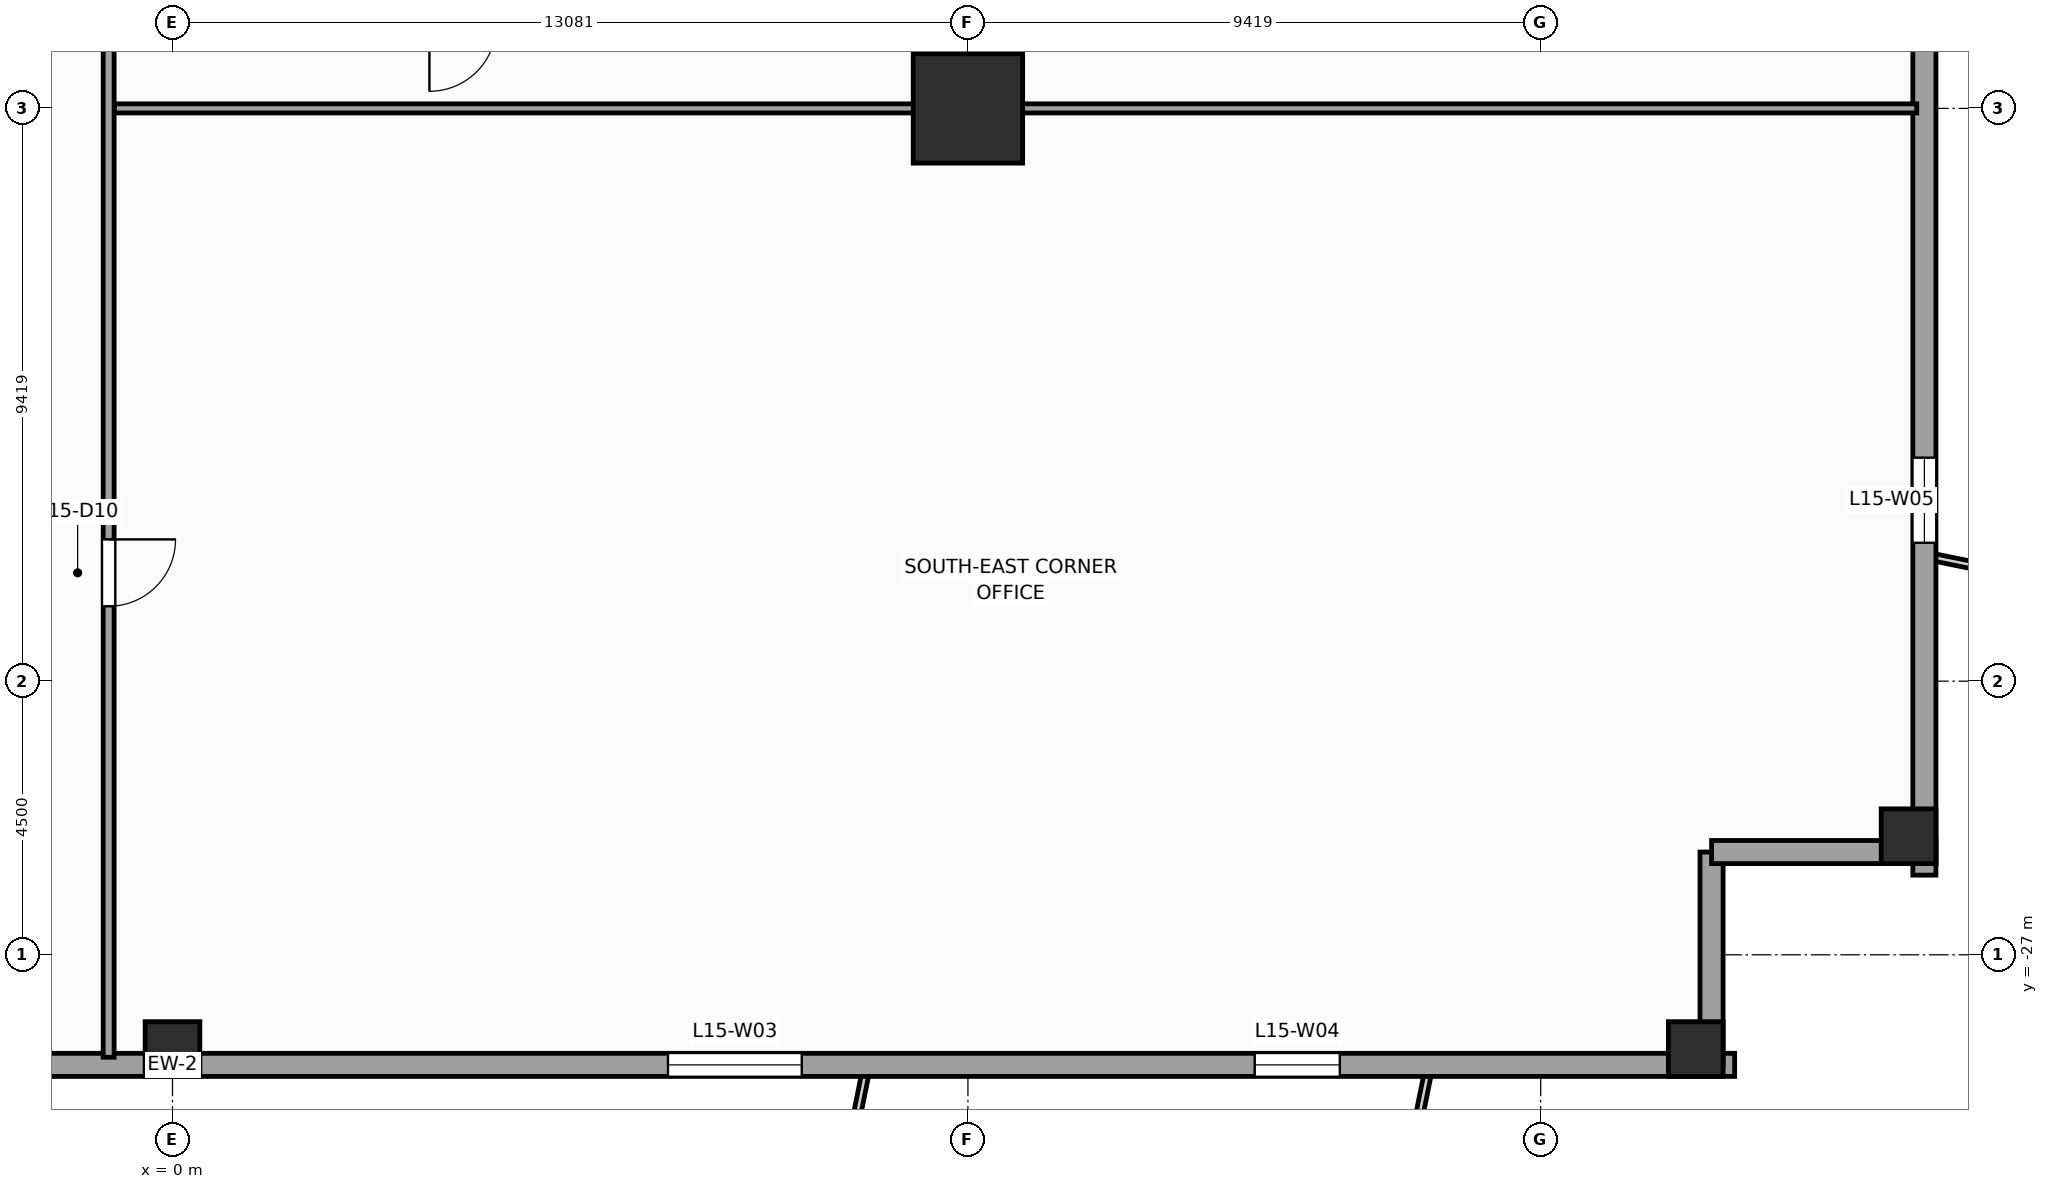
"""IFC4 building model, lengths in metres.
Left out: names, types, materials, properties, quantities, classifications, styles, units other than length and angle.
Written with IfcOpenShell. Run it as: python <this file> out.ifc"""

import sys

from ifc_helpers import new_model, si_unit, direction, frame, frame_2d, origin, origin_2d, place, context, subcontext, project, spatial, rectangle, extrude, source, transform, mapped, element, fill, save


model = new_model("IFC4")
c1 = context("Model", 3, precision=1e-05, world=origin(), true_north=direction((0.0, 1.0)))
c2 = subcontext(c1, "Body", "Model", "MODEL_VIEW")
j1 = project(units=[si_unit("LENGTHUNIT", "METRE"), si_unit("PLANEANGLEUNIT", "RADIAN")], contexts=[c1])
p1 = place(None, origin())
s1 = spatial("IfcSite", under=j1, at=p1, CompositionType="ELEMENT")
p2 = place(p1, origin())
s2 = spatial("IfcBuilding", under=s1, at=p2, CompositionType="ELEMENT")
p3 = place(p2, frame((0.0, 0.0, 66.0)))
s3 = spatial("IfcBuildingStorey", under=s2, at=p3, CompositionType="ELEMENT", Elevation=66.0)
m1 = source(origin(), c2, "Body", "SweptSolid", [
    extrude(rectangle(XDim=1.8, YDim=1.8, at=origin_2d()), origin(), (0.0, 0.0, 1.0), 4.0),
])
p4 = place(p3, frame((13.081, -13.081, 0.0), z_axis=(0.0, 0.0, 1.0), x_axis=(1.0, 0.0, 0.0)))
e1 = element("IfcColumn", 1, at=p4, inside=s3, PredefinedType="COLUMN", context=c2, shape_type="MappedRepresentation", body=[
    mapped(m1, transform((0.0, 0.0, 0.0), scale=1.0)),
])
m2 = source(origin(), c2, "Body", "SweptSolid", [
    extrude(rectangle(XDim=0.9, YDim=0.9, at=origin_2d()), origin(), (0.0, 0.0, 1.0), 4.0),
])
for number, where, z_axis, x_axis in (
    (2, (0.0, -28.55, 0.0), (0.0, 0.0, 1.0), (1.0, 0.0, 0.0)),
    (3, (25.05, -28.55, 0.0), (0.0, 0.0, 1.0), (1.0, 0.0, 0.0)),
    (4, (28.55, -25.05, 0.0), (0.0, 0.0, 1.0), (1.0, 0.0, 0.0)),
):
    element("IfcColumn", number, at=place(p3, frame(where, z_axis=z_axis, x_axis=x_axis)), inside=s3, PredefinedType="COLUMN", context=c2, shape_type="MappedRepresentation", body=[
        mapped(m2, transform((0.0, 0.0, 0.0), scale=1.0)),
    ])
p5 = place(p3, frame((-25.69, -28.81, 0.0), z_axis=(0.0, 0.0, 1.0), x_axis=(1.0, 0.0, 0.0)))
e5 = element("IfcWall", 5, at=p5, inside=s3, PredefinedType="STANDARD", context=c2, shape_type="SweptSolid", body=[
    extrude(rectangle(XDim=51.38, YDim=0.38, at=frame_2d((25.69, 0.0))), origin(), (0.0, 0.0, 1.0), 3.12),
])
p6 = place(p5, frame((19.565, 0.0, 0.0)))
e6 = element("IfcOpeningElement", 6, at=p6, cuts=e5, PredefinedType="OPENING", context=c2, shape_type="SweptSolid", body=[
    extrude(rectangle(XDim=1.05, YDim=2.25, at=frame_2d((0.525, 1.125))), frame((0.0, 0.2, 0.0), z_axis=(0.0, -1.0, 0.0), x_axis=(1.0, 0.0, 0.0)), (0.0, 0.0, 1.0), 0.4),
])
p7 = place(p5, frame((5.466, 0.0, 0.49)))
e7 = element("IfcOpeningElement", 7, at=p7, cuts=e5, PredefinedType="OPENING", context=c2, shape_type="SweptSolid", body=[
    extrude(rectangle(XDim=1.4, YDim=2.4, at=frame_2d((0.7, 1.2))), frame((0.0, 0.2, 0.0), z_axis=(0.0, -1.0, 0.0), x_axis=(1.0, 0.0, 0.0)), (0.0, 0.0, 1.0), 0.4),
])
p8 = place(p5, frame((13.8, 0.0, 0.49)))
e8 = element("IfcOpeningElement", 8, at=p8, cuts=e5, PredefinedType="OPENING", context=c2, shape_type="SweptSolid", body=[
    extrude(rectangle(XDim=2.2, YDim=2.4, at=frame_2d((1.1, 1.2))), frame((0.0, 0.2, 0.0), z_axis=(0.0, -1.0, 0.0), x_axis=(1.0, 0.0, 0.0)), (0.0, 0.0, 1.0), 0.4),
])
p9 = place(p5, frame((33.838, 0.0, 0.49)))
e9 = element("IfcOpeningElement", 9, at=p9, cuts=e5, PredefinedType="OPENING", context=c2, shape_type="SweptSolid", body=[
    extrude(rectangle(XDim=2.2, YDim=2.4, at=frame_2d((1.1, 1.2))), frame((0.0, 0.2, 0.0), z_axis=(0.0, -1.0, 0.0), x_axis=(1.0, 0.0, 0.0)), (0.0, 0.0, 1.0), 0.4),
])
p10 = place(p5, frame((43.487, 0.0, 0.49)))
e10 = element("IfcOpeningElement", 10, at=p10, cuts=e5, PredefinedType="OPENING", context=c2, shape_type="SweptSolid", body=[
    extrude(rectangle(XDim=1.4, YDim=2.4, at=frame_2d((0.7, 1.2))), frame((0.0, 0.2, 0.0), z_axis=(0.0, -1.0, 0.0), x_axis=(1.0, 0.0, 0.0)), (0.0, 0.0, 1.0), 0.4),
])
p11 = place(p3, frame((25.31, -28.81, 0.0), z_axis=(0.0, 0.0, 1.0), x_axis=(0.0, 1.0, 0.0)))
e11 = element("IfcWall", 11, at=p11, inside=s3, PredefinedType="STANDARD", context=c2, shape_type="SweptSolid", body=[
    extrude(rectangle(XDim=3.5, YDim=0.38, at=frame_2d((1.75, 0.0))), origin(), (0.0, 0.0, 1.0), 3.72),
])
p12 = place(p3, frame((25.31, -25.31, 0.0), z_axis=(0.0, 0.0, 1.0), x_axis=(1.0, 0.0, 0.0)))
e12 = element("IfcWall", 12, at=p12, inside=s3, PredefinedType="STANDARD", context=c2, shape_type="SweptSolid", body=[
    extrude(rectangle(XDim=3.69, YDim=0.38, at=frame_2d((1.845, 0.0))), origin(), (0.0, 0.0, 1.0), 3.72),
])
p13 = place(p3, frame((28.81, -25.69, 0.0), z_axis=(0.0, 0.0, 1.0), x_axis=(0.0, 1.0, 0.0)))
e13 = element("IfcWall", 13, at=p13, inside=s3, PredefinedType="STANDARD", context=c2, shape_type="SweptSolid", body=[
    extrude(rectangle(XDim=51.38, YDim=0.38, at=frame_2d((25.69, 0.0))), origin(), (0.0, 0.0, 1.0), 3.12),
])
p14 = place(p13, frame((5.466, 0.0, 0.49)))
e14 = element("IfcOpeningElement", 14, at=p14, cuts=e13, PredefinedType="OPENING", context=c2, shape_type="SweptSolid", body=[
    extrude(rectangle(XDim=1.4, YDim=2.4, at=frame_2d((0.7, 1.2))), frame((0.0, 0.2, 0.0), z_axis=(0.0, -1.0, 0.0), x_axis=(1.0, 0.0, 0.0)), (0.0, 0.0, 1.0), 0.4),
])
p15 = place(p13, frame((13.8, 0.0, 0.49)))
e15 = element("IfcOpeningElement", 15, at=p15, cuts=e13, PredefinedType="OPENING", context=c2, shape_type="SweptSolid", body=[
    extrude(rectangle(XDim=2.2, YDim=2.4, at=frame_2d((1.1, 1.2))), frame((0.0, 0.2, 0.0), z_axis=(0.0, -1.0, 0.0), x_axis=(1.0, 0.0, 0.0)), (0.0, 0.0, 1.0), 0.4),
])
p16 = place(p13, frame((22.062, 0.0, 0.49)))
e16 = element("IfcOpeningElement", 16, at=p16, cuts=e13, PredefinedType="OPENING", context=c2, shape_type="SweptSolid", body=[
    extrude(rectangle(XDim=2.2, YDim=2.4, at=frame_2d((1.1, 1.2))), frame((0.0, 0.2, 0.0), z_axis=(0.0, -1.0, 0.0), x_axis=(1.0, 0.0, 0.0)), (0.0, 0.0, 1.0), 0.4),
])
p17 = place(p13, frame((33.838, 0.0, 0.49)))
e17 = element("IfcOpeningElement", 17, at=p17, cuts=e13, PredefinedType="OPENING", context=c2, shape_type="SweptSolid", body=[
    extrude(rectangle(XDim=2.2, YDim=2.4, at=frame_2d((1.1, 1.2))), frame((0.0, 0.2, 0.0), z_axis=(0.0, -1.0, 0.0), x_axis=(1.0, 0.0, 0.0)), (0.0, 0.0, 1.0), 0.4),
])
p18 = place(p13, frame((43.487, 0.0, 0.49)))
e18 = element("IfcOpeningElement", 18, at=p18, cuts=e13, PredefinedType="OPENING", context=c2, shape_type="SweptSolid", body=[
    extrude(rectangle(XDim=1.4, YDim=2.4, at=frame_2d((0.7, 1.2))), frame((0.0, 0.2, 0.0), z_axis=(0.0, -1.0, 0.0), x_axis=(1.0, 0.0, 0.0)), (0.0, 0.0, 1.0), 0.4),
])
p19 = place(p3, frame((-1.05, -28.685, 0.0), z_axis=(0.0, 0.0, 1.0), x_axis=(0.0, 1.0, 0.0)))
e19 = element("IfcWall", 19, at=p19, inside=s3, PredefinedType="PARTITIONING", context=c2, shape_type="SweptSolid", body=[
    extrude(rectangle(XDim=16.885, YDim=0.18, at=frame_2d((8.442, 0.0))), origin(), (0.0, 0.0, 1.0), 3.72),
])
p20 = place(p19, frame((7.417, 0.0, 0.0)))
e20 = element("IfcOpeningElement", 20, at=p20, cuts=e19, PredefinedType="OPENING", context=c2, shape_type="SweptSolid", body=[
    extrude(rectangle(XDim=1.1, YDim=2.2, at=frame_2d((0.55, 1.1))), frame((0.0, 0.1, 0.0), z_axis=(0.0, -1.0, 0.0), x_axis=(1.0, 0.0, 0.0)), (0.0, 0.0, 1.0), 0.2),
])
p21 = place(p3, frame((-0.955, -13.081, 0.0), z_axis=(0.0, 0.0, 1.0), x_axis=(1.0, 0.0, 0.0)))
e21 = element("IfcWall", 21, at=p21, inside=s3, PredefinedType="PARTITIONING", context=c2, shape_type="SweptSolid", body=[
    extrude(rectangle(XDim=29.64, YDim=0.15, at=frame_2d((14.82, 0.0))), origin(), (0.0, 0.0, 1.0), 2.712),
])
m3 = source(origin(), c2, "Body", "SweptSolid", [
    extrude(rectangle(XDim=2.2, YDim=2.4, at=frame_2d((1.1, 1.2))), frame((0.0, 0.03, 0.0), z_axis=(0.0, -1.0, 0.0), x_axis=(1.0, 0.0, 0.0)), (0.0, 0.0, 1.0), 0.06),
])
p22 = place(p9, origin())
e22 = element("IfcWindow", 22, at=p22, inside=s3, PartitioningType="SINGLE_PANEL", PredefinedType="WINDOW", context=c2, shape_type="MappedRepresentation", body=[
    mapped(m3, transform((0.0, 0.0, 0.0), scale=1.0)),
])
fill(e9, e22)
m4 = source(origin(), c2, "Body", "SweptSolid", [
    extrude(rectangle(XDim=1.4, YDim=2.4, at=frame_2d((0.7, 1.2))), frame((0.0, 0.03, 0.0), z_axis=(0.0, -1.0, 0.0), x_axis=(1.0, 0.0, 0.0)), (0.0, 0.0, 1.0), 0.06),
])
p23 = place(p10, origin())
e23 = element("IfcWindow", 23, at=p23, inside=s3, PartitioningType="SINGLE_PANEL", PredefinedType="WINDOW", context=c2, shape_type="MappedRepresentation", body=[
    mapped(m4, transform((0.0, 0.0, 0.0), scale=1.0)),
])
fill(e10, e23)
p24 = place(p14, origin())
e24 = element("IfcWindow", 24, at=p24, inside=s3, PartitioningType="SINGLE_PANEL", PredefinedType="WINDOW", context=c2, shape_type="MappedRepresentation", body=[
    mapped(m4, transform((0.0, 0.0, 0.0), scale=1.0)),
])
fill(e14, e24)
m5 = source(origin(), c2, "Body", "SweptSolid", [
    extrude(rectangle(XDim=1.1, YDim=2.2, at=frame_2d((0.55, 1.1))), frame((0.0, 0.025, 0.0), z_axis=(0.0, -1.0, 0.0), x_axis=(1.0, 0.0, 0.0)), (0.0, 0.0, 1.0), 0.05),
])
p25 = place(p20, frame((1.1, 0.0, 0.0), z_axis=(0.0, 0.0, 1.0), x_axis=(-1.0, 0.0, 0.0)))
e25 = element("IfcDoor", 25, at=p25, inside=s3, OperationType="SINGLE_SWING_RIGHT", PredefinedType="DOOR", context=c2, shape_type="MappedRepresentation", body=[
    mapped(m5, transform((0.0, 0.0, 0.0), scale=1.0)),
])
fill(e20, e25)
save(model, sys.argv[1])
